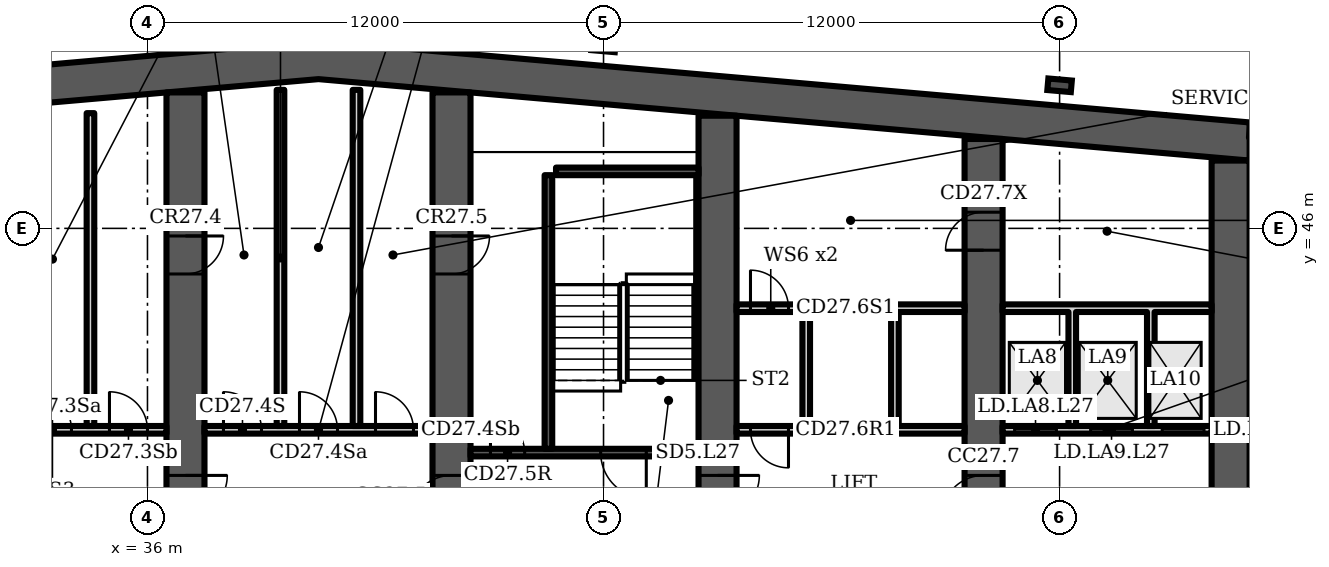
"""IFC4 building model, lengths in metres.
Left out: names, types, materials, properties, quantities, classifications, styles, units other than length and angle.
Written with IfcOpenShell. Run it as: python <this file> out.ifc"""

import sys

from ifc_helpers import new_model, si_unit, direction, frame, frame_2d, origin, origin_2d, place, context, subcontext, project, spatial, polyline, rectangle, i_section, outline, extrude, element, fill, save


model = new_model("IFC4")
c1 = context("Model", 3, precision=1e-05, world=origin(), true_north=direction((0.0, 1.0)))
c2 = subcontext(c1, "Body", "Model", "MODEL_VIEW")
j1 = project(units=[si_unit("LENGTHUNIT", "METRE"), si_unit("PLANEANGLEUNIT", "RADIAN")], contexts=[c1])
p1 = place(None, origin())
s1 = spatial("IfcSite", under=j1, at=p1, CompositionType="ELEMENT")
p2 = place(p1, origin())
s2 = spatial("IfcBuilding", under=s1, at=p2, CompositionType="ELEMENT")
p3 = place(p2, frame((0.0, 0.0, 118.3)))
s3 = spatial("IfcBuildingStorey", under=s2, at=p3, CompositionType="ELEMENT", Elevation=118.3)
p4 = place(p3, frame((0.0, 0.0, -0.0)))
e1 = element("IfcWall", 1, at=p4, inside=s3, PredefinedType="SHEAR", context=c2, shape_type="SweptSolid", body=[
    extrude(outline(polyline([(16.0, 47.784), (40.5, 49.927), (65.0, 47.784), (65.0, 48.787), (40.5, 50.931), (16.0, 48.787), (16.0, 47.784)])), origin(), (0.0, 0.0, 1.0), 3.6),
])
p5 = place(p3, frame((37.0, 35.0, 0.0), z_axis=(0.0, 0.0, 1.0), x_axis=(0.0, 1.0, 0.0)))
e2 = element("IfcWall", 2, at=p5, inside=s3, PredefinedType="SHEAR", context=c2, shape_type="SweptSolid", body=[
    extrude(rectangle(XDim=14.577, YDim=1.0, at=frame_2d((7.289, 0.0))), origin(), (0.0, 0.0, 1.0), 3.6),
])
p6 = place(p5, frame((3.4, 0.0, 0.0)))
e3 = element("IfcOpeningElement", 3, at=p6, cuts=e2, PredefinedType="OPENING", context=c2, shape_type="SweptSolid", body=[
    extrude(rectangle(XDim=1.1, YDim=2.1, at=frame_2d((0.55, 1.05))), frame((0.0, 0.51, 0.0), z_axis=(0.0, -1.0, 0.0), x_axis=(1.0, 0.0, 0.0)), (0.0, 0.0, 1.0), 1.02),
])
p7 = place(p5, frame((9.8, 0.0, 0.0)))
e4 = element("IfcOpeningElement", 4, at=p7, cuts=e2, PredefinedType="OPENING", context=c2, shape_type="SweptSolid", body=[
    extrude(rectangle(XDim=1.0, YDim=2.1, at=frame_2d((0.5, 1.05))), frame((0.0, 0.51, 0.0), z_axis=(0.0, -1.0, 0.0), x_axis=(1.0, 0.0, 0.0)), (0.0, 0.0, 1.0), 1.02),
])
p8 = place(p3, frame((44.0, 35.0, 0.0), z_axis=(0.0, 0.0, 1.0), x_axis=(0.0, 1.0, 0.0)))
e5 = element("IfcWall", 5, at=p8, inside=s3, PredefinedType="SHEAR", context=c2, shape_type="SweptSolid", body=[
    extrude(rectangle(XDim=14.577, YDim=1.0, at=frame_2d((7.289, 0.0))), origin(), (0.0, 0.0, 1.0), 3.6),
])
p9 = place(p8, frame((3.4, 0.0, 0.0)))
e6 = element("IfcOpeningElement", 6, at=p9, cuts=e5, PredefinedType="OPENING", context=c2, shape_type="SweptSolid", body=[
    extrude(rectangle(XDim=1.1, YDim=2.1, at=frame_2d((0.55, 1.05))), frame((0.0, 0.51, 0.0), z_axis=(0.0, -1.0, 0.0), x_axis=(1.0, 0.0, 0.0)), (0.0, 0.0, 1.0), 1.02),
])
p10 = place(p8, frame((9.8, 0.0, 0.0)))
e7 = element("IfcOpeningElement", 7, at=p10, cuts=e5, PredefinedType="OPENING", context=c2, shape_type="SweptSolid", body=[
    extrude(rectangle(XDim=1.0, YDim=2.1, at=frame_2d((0.5, 1.05))), frame((0.0, 0.51, 0.0), z_axis=(0.0, -1.0, 0.0), x_axis=(1.0, 0.0, 0.0)), (0.0, 0.0, 1.0), 1.02),
])
p11 = place(p3, frame((51.0, 35.0, 0.0), z_axis=(0.0, 0.0, 1.0), x_axis=(0.0, 1.0, 0.0)))
e8 = element("IfcWall", 8, at=p11, inside=s3, PredefinedType="SHEAR", context=c2, shape_type="SweptSolid", body=[
    extrude(rectangle(XDim=13.965, YDim=1.0, at=frame_2d((6.982, 0.0))), origin(), (0.0, 0.0, 1.0), 3.6),
])
p12 = place(p11, frame((3.4, 0.0, 0.0)))
e9 = element("IfcOpeningElement", 9, at=p12, cuts=e8, PredefinedType="OPENING", context=c2, shape_type="SweptSolid", body=[
    extrude(rectangle(XDim=1.1, YDim=2.1, at=frame_2d((0.55, 1.05))), frame((0.0, 0.51, 0.0), z_axis=(0.0, -1.0, 0.0), x_axis=(1.0, 0.0, 0.0)), (0.0, 0.0, 1.0), 1.02),
])
p13 = place(p3, frame((58.0, 35.0, 0.0), z_axis=(0.0, 0.0, 1.0), x_axis=(0.0, 1.0, 0.0)))
e10 = element("IfcWall", 10, at=p13, inside=s3, PredefinedType="SHEAR", context=c2, shape_type="SweptSolid", body=[
    extrude(rectangle(XDim=13.352, YDim=1.0, at=frame_2d((6.676, 0.0))), origin(), (0.0, 0.0, 1.0), 3.6),
])
p14 = place(p13, frame((10.426, 0.0, 0.0)))
e11 = element("IfcOpeningElement", 11, at=p14, cuts=e10, PredefinedType="OPENING", context=c2, shape_type="SweptSolid", body=[
    extrude(rectangle(XDim=1.0, YDim=2.1, at=frame_2d((0.5, 1.05))), frame((0.0, 0.51, 0.0), z_axis=(0.0, -1.0, 0.0), x_axis=(1.0, 0.0, 0.0)), (0.0, 0.0, 1.0), 1.02),
])
p15 = place(p13, frame((3.4, 0.0, 0.0)))
e12 = element("IfcOpeningElement", 12, at=p15, cuts=e10, PredefinedType="OPENING", context=c2, shape_type="SweptSolid", body=[
    extrude(rectangle(XDim=1.1, YDim=2.1, at=frame_2d((0.55, 1.05))), frame((0.0, 0.51, 0.0), z_axis=(0.0, -1.0, 0.0), x_axis=(1.0, 0.0, 0.0)), (0.0, 0.0, 1.0), 1.02),
])
p16 = place(p3, frame((64.5, 35.0, 0.0), z_axis=(0.0, 0.0, 1.0), x_axis=(0.0, 1.0, 0.0)))
e13 = element("IfcWall", 13, at=p16, inside=s3, PredefinedType="SHEAR", context=c2, shape_type="SweptSolid", body=[
    extrude(rectangle(XDim=12.784, YDim=1.0, at=frame_2d((6.392, 0.0))), origin(), (0.0, 0.0, 1.0), 3.6),
])
for number, where, z_axis, x_axis in (
    (14, (48.0, 50.815, 0.0), (0.0, 0.0, 1.0), (0.087, 0.996, 0.0)),
    (15, (60.0, 49.765, 0.0), (0.0, 0.0, 1.0), (0.087, 0.996, 0.0)),
):
    element("IfcColumn", number, at=place(p3, frame(where, z_axis=z_axis, x_axis=x_axis)), inside=s3, PredefinedType="COLUMN", context=c2, shape_type="SweptSolid", body=[
        extrude(i_section(OverallWidth=0.305, OverallDepth=0.62, WebThickness=0.021, FlangeThickness=0.04, FilletRadius=0.027, at=origin_2d()), origin(), (0.0, 0.0, 1.0), 3.6),
    ])
p17 = place(p3, frame((67.983, 48.326, 0.0), z_axis=(0.0, 0.0, 1.0), x_axis=(-0.996194, 0.087168, 0.0)))
e16 = element("IfcWall", 16, at=p17, inside=s3, PredefinedType="SOLIDWALL", context=c2, shape_type="SweptSolid", body=[
    extrude(rectangle(XDim=2.994, YDim=0.4, at=frame_2d((1.497, 0.0))), origin(), (0.0, 0.0, 1.0), 3.2),
])
p18 = place(p3, frame((30.5, 40.7, 0.0), z_axis=(0.0, 0.0, 1.0), x_axis=(1.0, 0.0, 0.0)))
e17 = element("IfcWall", 17, at=p18, inside=s3, PredefinedType="PARTITIONING", context=c2, shape_type="SweptSolid", body=[
    extrude(rectangle(XDim=6.0, YDim=0.2, at=frame_2d((3.0, 0.0))), origin(), (0.0, 0.0, 1.0), 3.2),
])
p19 = place(p18, frame((0.5, 0.0, 0.0)))
e18 = element("IfcOpeningElement", 18, at=p19, cuts=e17, PredefinedType="OPENING", context=c2, shape_type="SweptSolid", body=[
    extrude(rectangle(XDim=1.0, YDim=2.1, at=frame_2d((0.5, 1.05))), frame((0.0, 0.11, 0.0), z_axis=(0.0, -1.0, 0.0), x_axis=(1.0, 0.0, 0.0)), (0.0, 0.0, 1.0), 0.22),
])
p20 = place(p18, frame((2.5, 0.0, 0.0)))
e19 = element("IfcOpeningElement", 19, at=p20, cuts=e17, PredefinedType="OPENING", context=c2, shape_type="SweptSolid", body=[
    extrude(rectangle(XDim=1.0, YDim=2.1, at=frame_2d((0.5, 1.05))), frame((0.0, 0.11, 0.0), z_axis=(0.0, -1.0, 0.0), x_axis=(1.0, 0.0, 0.0)), (0.0, 0.0, 1.0), 0.22),
])
p21 = place(p18, frame((4.5, 0.0, 0.0)))
e20 = element("IfcOpeningElement", 20, at=p21, cuts=e17, PredefinedType="OPENING", context=c2, shape_type="SweptSolid", body=[
    extrude(rectangle(XDim=1.0, YDim=2.1, at=frame_2d((0.5, 1.05))), frame((0.0, 0.11, 0.0), z_axis=(0.0, -1.0, 0.0), x_axis=(1.0, 0.0, 0.0)), (0.0, 0.0, 1.0), 0.22),
])
p22 = place(p3, frame((34.5, 40.8, 0.0), z_axis=(0.0, 0.0, 1.0), x_axis=(0.0, 1.0, 0.0)))
e21 = element("IfcWall", 21, at=p22, inside=s3, PredefinedType="PARTITIONING", context=c2, shape_type="SweptSolid", body=[
    extrude(rectangle(XDim=8.232, YDim=0.2, at=frame_2d((4.116, 0.0))), origin(), (0.0, 0.0, 1.0), 3.2),
])
p23 = place(p3, frame((37.5, 40.7, 0.0), z_axis=(0.0, 0.0, 1.0), x_axis=(1.0, 0.0, 0.0)))
e22 = element("IfcWall", 22, at=p23, inside=s3, PredefinedType="PARTITIONING", context=c2, shape_type="SweptSolid", body=[
    extrude(rectangle(XDim=6.0, YDim=0.2, at=frame_2d((3.0, 0.0))), origin(), (0.0, 0.0, 1.0), 3.2),
])
p24 = place(p23, frame((0.5, 0.0, 0.0)))
e23 = element("IfcOpeningElement", 23, at=p24, cuts=e22, PredefinedType="OPENING", context=c2, shape_type="SweptSolid", body=[
    extrude(rectangle(XDim=1.0, YDim=2.1, at=frame_2d((0.5, 1.05))), frame((0.0, 0.11, 0.0), z_axis=(0.0, -1.0, 0.0), x_axis=(1.0, 0.0, 0.0)), (0.0, 0.0, 1.0), 0.22),
])
p25 = place(p23, frame((2.5, 0.0, 0.0)))
e24 = element("IfcOpeningElement", 24, at=p25, cuts=e22, PredefinedType="OPENING", context=c2, shape_type="SweptSolid", body=[
    extrude(rectangle(XDim=1.0, YDim=2.1, at=frame_2d((0.5, 1.05))), frame((0.0, 0.11, 0.0), z_axis=(0.0, -1.0, 0.0), x_axis=(1.0, 0.0, 0.0)), (0.0, 0.0, 1.0), 0.22),
])
p26 = place(p23, frame((4.5, 0.0, 0.0)))
e25 = element("IfcOpeningElement", 25, at=p26, cuts=e22, PredefinedType="OPENING", context=c2, shape_type="SweptSolid", body=[
    extrude(rectangle(XDim=1.0, YDim=2.1, at=frame_2d((0.5, 1.05))), frame((0.0, 0.11, 0.0), z_axis=(0.0, -1.0, 0.0), x_axis=(1.0, 0.0, 0.0)), (0.0, 0.0, 1.0), 0.22),
])
for number, where, z_axis, x_axis in (
    (26, (39.5, 40.8, 0.0), (0.0, 0.0, 1.0), (0.0, 1.0, 0.0)),
    (27, (41.5, 40.8, 0.0), (0.0, 0.0, 1.0), (0.0, 1.0, 0.0)),
):
    element("IfcWall", number, at=place(p3, frame(where, z_axis=z_axis, x_axis=x_axis)), inside=s3, PredefinedType="PARTITIONING", context=c2, shape_type="SweptSolid", body=[
        extrude(rectangle(XDim=8.844, YDim=0.2, at=frame_2d((4.422, 0.0))), origin(), (0.0, 0.0, 1.0), 3.2),
    ])
p27 = place(p3, frame((44.5, 40.1, 0.0), z_axis=(0.0, 0.0, 1.0), x_axis=(1.0, 0.0, 0.0)))
e28 = element("IfcWall", 28, at=p27, inside=s3, PredefinedType="SHEAR", context=c2, shape_type="SweptSolid", body=[
    extrude(rectangle(XDim=6.0, YDim=0.2, at=frame_2d((3.0, 0.0))), origin(), (0.0, 0.0, 1.0), 3.2),
])
p28 = place(p27, frame((3.425, 0.0, 0.0)))
e29 = element("IfcOpeningElement", 29, at=p28, cuts=e28, PredefinedType="OPENING", context=c2, shape_type="SweptSolid", body=[
    extrude(rectangle(XDim=1.2, YDim=2.1, at=frame_2d((0.6, 1.05))), frame((0.0, 0.11, 0.0), z_axis=(0.0, -1.0, 0.0), x_axis=(1.0, 0.0, 0.0)), (0.0, 0.0, 1.0), 0.22),
])
p29 = place(p27, frame((0.525, 0.0, 0.0)))
e30 = element("IfcOpeningElement", 30, at=p29, cuts=e28, PredefinedType="OPENING", context=c2, shape_type="SweptSolid", body=[
    extrude(rectangle(XDim=0.9, YDim=2.1, at=frame_2d((0.45, 1.05))), frame((0.0, 0.11, 0.0), z_axis=(0.0, -1.0, 0.0), x_axis=(1.0, 0.0, 0.0)), (0.0, 0.0, 1.0), 0.22),
])
p30 = place(p3, frame((46.55, 40.2, 0.0), z_axis=(0.0, 0.0, 1.0), x_axis=(0.0, 1.0, 0.0)))
e31 = element("IfcWall", 31, at=p30, inside=s3, PredefinedType="SHEAR", context=c2, shape_type="SweptSolid", body=[
    extrude(rectangle(XDim=7.2, YDim=0.2, at=frame_2d((3.6, 0.0))), origin(), (0.0, 0.0, 1.0), 3.2),
])
p31 = place(p3, frame((46.75, 47.5, 0.0), z_axis=(0.0, 0.0, 1.0), x_axis=(1.0, 0.0, 0.0)))
e32 = element("IfcWall", 32, at=p31, inside=s3, PredefinedType="SHEAR", context=c2, shape_type="SweptSolid", body=[
    extrude(rectangle(XDim=3.75, YDim=0.2, at=frame_2d((1.875, 0.0))), origin(), (0.0, 0.0, 1.0), 3.2),
])
p32 = place(p3, frame((51.5, 40.7, 0.0), z_axis=(0.0, 0.0, 1.0), x_axis=(1.0, 0.0, 0.0)))
e33 = element("IfcWall", 33, at=p32, inside=s3, PredefinedType="PARTITIONING", context=c2, shape_type="SweptSolid", body=[
    extrude(rectangle(XDim=6.0, YDim=0.2, at=frame_2d((3.0, 0.0))), origin(), (0.0, 0.0, 1.0), 3.2),
])
p33 = place(p32, frame((0.367, 0.0, 0.0)))
e34 = element("IfcOpeningElement", 34, at=p33, cuts=e33, PredefinedType="OPENING", context=c2, shape_type="SweptSolid", body=[
    extrude(rectangle(XDim=1.0, YDim=2.1, at=frame_2d((0.5, 1.05))), frame((0.0, 0.11, 0.0), z_axis=(0.0, -1.0, 0.0), x_axis=(1.0, 0.0, 0.0)), (0.0, 0.0, 1.0), 0.22),
])
p34 = place(p3, frame((51.5, 43.9, 0.0), z_axis=(0.0, 0.0, 1.0), x_axis=(1.0, 0.0, 0.0)))
e35 = element("IfcWall", 35, at=p34, inside=s3, PredefinedType="PARTITIONING", context=c2, shape_type="SweptSolid", body=[
    extrude(rectangle(XDim=6.0, YDim=0.2, at=frame_2d((3.0, 0.0))), origin(), (0.0, 0.0, 1.0), 3.2),
])
p35 = place(p34, frame((0.367, 0.0, 0.0)))
e36 = element("IfcOpeningElement", 36, at=p35, cuts=e35, PredefinedType="OPENING", context=c2, shape_type="SweptSolid", body=[
    extrude(rectangle(XDim=1.0, YDim=2.1, at=frame_2d((0.5, 1.05))), frame((0.0, 0.11, 0.0), z_axis=(0.0, -1.0, 0.0), x_axis=(1.0, 0.0, 0.0)), (0.0, 0.0, 1.0), 0.22),
])
p36 = place(p3, frame((0.0, 0.0, -0.0)))
e37 = element("IfcWall", 37, at=p36, inside=s3, PredefinedType="PARTITIONING", context=c2, shape_type="SweptSolid", body=[
    extrude(outline(polyline([(53.233, 40.8), (53.233, 43.8), (53.433, 43.8), (53.433, 40.8), (53.233, 40.8)])), origin(), (0.0, 0.0, 1.0), 3.2),
])
p37 = place(p3, frame((0.0, 0.0, -0.0)))
e38 = element("IfcWall", 38, at=p37, inside=s3, PredefinedType="PARTITIONING", context=c2, shape_type="SweptSolid", body=[
    extrude(outline(polyline([(55.567, 40.8), (55.567, 43.8), (55.767, 43.8), (55.767, 40.8), (55.567, 40.8)])), origin(), (0.0, 0.0, 1.0), 3.2),
])
p38 = place(p3, frame((58.5, 40.7, 0.0), z_axis=(0.0, 0.0, 1.0), x_axis=(1.0, 0.0, 0.0)))
e39 = element("IfcWall", 39, at=p38, inside=s3, PredefinedType="PARTITIONING", context=c2, shape_type="SweptSolid", body=[
    extrude(rectangle(XDim=5.5, YDim=0.2, at=frame_2d((2.75, 0.0))), origin(), (0.0, 0.0, 1.0), 3.2),
])
p39 = place(p38, frame((0.317, 0.0, 0.0)))
e40 = element("IfcOpeningElement", 40, at=p39, cuts=e39, PredefinedType="OPENING", context=c2, shape_type="SweptSolid", body=[
    extrude(rectangle(XDim=1.1, YDim=2.1, at=frame_2d((0.55, 1.05))), frame((0.0, 0.11, 0.0), z_axis=(0.0, -1.0, 0.0), x_axis=(1.0, 0.0, 0.0)), (0.0, 0.0, 1.0), 0.22),
])
p40 = place(p38, frame((2.317, 0.0, 0.0)))
e41 = element("IfcOpeningElement", 41, at=p40, cuts=e39, PredefinedType="OPENING", context=c2, shape_type="SweptSolid", body=[
    extrude(rectangle(XDim=1.1, YDim=2.1, at=frame_2d((0.55, 1.05))), frame((0.0, 0.11, 0.0), z_axis=(0.0, -1.0, 0.0), x_axis=(1.0, 0.0, 0.0)), (0.0, 0.0, 1.0), 0.22),
])
p41 = place(p38, frame((4.2, 0.0, 0.0)))
e42 = element("IfcOpeningElement", 42, at=p41, cuts=e39, PredefinedType="OPENING", context=c2, shape_type="SweptSolid", body=[
    extrude(rectangle(XDim=1.1, YDim=2.1, at=frame_2d((0.55, 1.05))), frame((0.0, 0.11, 0.0), z_axis=(0.0, -1.0, 0.0), x_axis=(1.0, 0.0, 0.0)), (0.0, 0.0, 1.0), 0.22),
])
p42 = place(p3, frame((0.0, 0.0, -0.0)))
e43 = element("IfcWall", 43, at=p42, inside=s3, PredefinedType="PARTITIONING", context=c2, shape_type="SweptSolid", body=[
    extrude(outline(polyline([(60.433, 40.8), (60.233, 40.8), (60.233, 43.8), (58.5, 43.8), (58.5, 44.0), (64.0, 44.0), (64.0, 43.8), (62.5, 43.8), (62.5, 40.8), (62.3, 40.8), (62.3, 43.8), (60.433, 43.8), (60.433, 40.8)])), origin(), (0.0, 0.0, 1.0), 3.2),
])
p43 = place(p20, origin())
e44 = element("IfcDoor", 44, at=p43, inside=s3, OperationType="SINGLE_SWING_LEFT", PredefinedType="DOOR", context=c2, shape_type="SweptSolid", body=[
    extrude(rectangle(XDim=1.0, YDim=2.1, at=frame_2d((0.5, 1.05))), frame((0.0, 0.025, 0.0), z_axis=(0.0, -1.0, 0.0), x_axis=(1.0, 0.0, 0.0)), (0.0, 0.0, 1.0), 0.05),
])
fill(e19, e44)
p44 = place(p21, origin())
e45 = element("IfcDoor", 45, at=p44, inside=s3, OperationType="SINGLE_SWING_LEFT", PredefinedType="DOOR", context=c2, shape_type="SweptSolid", body=[
    extrude(rectangle(XDim=1.0, YDim=2.1, at=frame_2d((0.5, 1.05))), frame((0.0, 0.025, 0.0), z_axis=(0.0, -1.0, 0.0), x_axis=(1.0, 0.0, 0.0)), (0.0, 0.0, 1.0), 0.05),
])
fill(e20, e45)
p45 = place(p24, origin())
e46 = element("IfcDoor", 46, at=p45, inside=s3, OperationType="SINGLE_SWING_LEFT", PredefinedType="DOOR", context=c2, shape_type="SweptSolid", body=[
    extrude(rectangle(XDim=1.0, YDim=2.1, at=frame_2d((0.5, 1.05))), frame((0.0, 0.025, 0.0), z_axis=(0.0, -1.0, 0.0), x_axis=(1.0, 0.0, 0.0)), (0.0, 0.0, 1.0), 0.05),
])
fill(e23, e46)
p46 = place(p25, origin())
e47 = element("IfcDoor", 47, at=p46, inside=s3, OperationType="SINGLE_SWING_LEFT", PredefinedType="DOOR", context=c2, shape_type="SweptSolid", body=[
    extrude(rectangle(XDim=1.0, YDim=2.1, at=frame_2d((0.5, 1.05))), frame((0.0, 0.025, 0.0), z_axis=(0.0, -1.0, 0.0), x_axis=(1.0, 0.0, 0.0)), (0.0, 0.0, 1.0), 0.05),
])
fill(e24, e47)
p47 = place(p26, origin())
e48 = element("IfcDoor", 48, at=p47, inside=s3, OperationType="SINGLE_SWING_LEFT", PredefinedType="DOOR", context=c2, shape_type="SweptSolid", body=[
    extrude(rectangle(XDim=1.0, YDim=2.1, at=frame_2d((0.5, 1.05))), frame((0.0, 0.025, 0.0), z_axis=(0.0, -1.0, 0.0), x_axis=(1.0, 0.0, 0.0)), (0.0, 0.0, 1.0), 0.05),
])
fill(e25, e48)
p48 = place(p28, origin())
e49 = element("IfcDoor", 49, at=p48, inside=s3, OperationType="SINGLE_SWING_RIGHT", PredefinedType="DOOR", context=c2, shape_type="SweptSolid", body=[
    extrude(rectangle(XDim=1.2, YDim=2.1, at=frame_2d((0.6, 1.05))), frame((0.0, 0.025, 0.0), z_axis=(0.0, -1.0, 0.0), x_axis=(1.0, 0.0, 0.0)), (0.0, 0.0, 1.0), 0.05),
])
fill(e29, e49)
p49 = place(p29, origin())
e50 = element("IfcDoor", 50, at=p49, inside=s3, OperationType="SINGLE_SWING_LEFT", PredefinedType="DOOR", context=c2, shape_type="SweptSolid", body=[
    extrude(rectangle(XDim=0.9, YDim=2.1, at=frame_2d((0.45, 1.05))), frame((0.0, 0.025, 0.0), z_axis=(0.0, -1.0, 0.0), x_axis=(1.0, 0.0, 0.0)), (0.0, 0.0, 1.0), 0.05),
])
fill(e30, e50)
p50 = place(p33, origin())
e51 = element("IfcDoor", 51, at=p50, inside=s3, OperationType="SINGLE_SWING_RIGHT", PredefinedType="DOOR", context=c2, shape_type="SweptSolid", body=[
    extrude(rectangle(XDim=1.0, YDim=2.1, at=frame_2d((0.5, 1.05))), frame((0.0, 0.025, 0.0), z_axis=(0.0, -1.0, 0.0), x_axis=(1.0, 0.0, 0.0)), (0.0, 0.0, 1.0), 0.05),
])
fill(e34, e51)
p51 = place(p35, origin())
e52 = element("IfcDoor", 52, at=p51, inside=s3, OperationType="SINGLE_SWING_LEFT", PredefinedType="DOOR", context=c2, shape_type="SweptSolid", body=[
    extrude(rectangle(XDim=1.0, YDim=2.1, at=frame_2d((0.5, 1.05))), frame((0.0, 0.025, 0.0), z_axis=(0.0, -1.0, 0.0), x_axis=(1.0, 0.0, 0.0)), (0.0, 0.0, 1.0), 0.05),
])
fill(e36, e52)
p52 = place(p39, origin())
e53 = element("IfcDoor", 53, at=p52, inside=s3, OperationType="DOUBLE_DOOR_SLIDING", PredefinedType="DOOR", context=c2, shape_type="SweptSolid", body=[
    extrude(rectangle(XDim=1.1, YDim=2.1, at=frame_2d((0.55, 1.05))), frame((0.0, 0.025, 0.0), z_axis=(0.0, -1.0, 0.0), x_axis=(1.0, 0.0, 0.0)), (0.0, 0.0, 1.0), 0.05),
])
fill(e40, e53)
p53 = place(p40, origin())
e54 = element("IfcDoor", 54, at=p53, inside=s3, OperationType="DOUBLE_DOOR_SLIDING", PredefinedType="DOOR", context=c2, shape_type="SweptSolid", body=[
    extrude(rectangle(XDim=1.1, YDim=2.1, at=frame_2d((0.55, 1.05))), frame((0.0, 0.025, 0.0), z_axis=(0.0, -1.0, 0.0), x_axis=(1.0, 0.0, 0.0)), (0.0, 0.0, 1.0), 0.05),
])
fill(e41, e54)
p54 = place(p41, origin())
e55 = element("IfcDoor", 55, at=p54, inside=s3, OperationType="DOUBLE_DOOR_SLIDING", PredefinedType="DOOR", context=c2, shape_type="SweptSolid", body=[
    extrude(rectangle(XDim=1.1, YDim=2.1, at=frame_2d((0.55, 1.05))), frame((0.0, 0.025, 0.0), z_axis=(0.0, -1.0, 0.0), x_axis=(1.0, 0.0, 0.0)), (0.0, 0.0, 1.0), 0.05),
])
fill(e42, e55)
p55 = place(p14, origin())
e56 = element("IfcDoor", 56, at=p55, inside=s3, OperationType="SINGLE_SWING_LEFT", PredefinedType="DOOR", context=c2, shape_type="SweptSolid", body=[
    extrude(rectangle(XDim=1.0, YDim=2.1, at=frame_2d((0.5, 1.05))), frame((0.0, 0.5, 0.0), z_axis=(0.0, -1.0, 0.0), x_axis=(1.0, 0.0, 0.0)), (0.0, 0.0, 1.0), 1.0),
])
fill(e11, e56)
p56 = place(p6, origin())
e57 = element("IfcDoor", 57, at=p56, inside=s3, OperationType="SINGLE_SWING_RIGHT", PredefinedType="DOOR", context=c2, shape_type="SweptSolid", body=[
    extrude(rectangle(XDim=1.1, YDim=2.1, at=frame_2d((0.55, 1.05))), frame((0.0, 0.025, 0.0), z_axis=(0.0, -1.0, 0.0), x_axis=(1.0, 0.0, 0.0)), (0.0, 0.0, 1.0), 0.05),
])
fill(e3, e57)
p57 = place(p7, origin())
e58 = element("IfcDoor", 58, at=p57, inside=s3, OperationType="SINGLE_SWING_RIGHT", PredefinedType="DOOR", context=c2, shape_type="SweptSolid", body=[
    extrude(rectangle(XDim=1.0, YDim=2.1, at=frame_2d((0.5, 1.05))), frame((0.0, 0.5, 0.0), z_axis=(0.0, -1.0, 0.0), x_axis=(1.0, 0.0, 0.0)), (0.0, 0.0, 1.0), 1.0),
])
fill(e4, e58)
p58 = place(p9, origin())
e59 = element("IfcDoor", 59, at=p58, inside=s3, OperationType="SINGLE_SWING_LEFT", PredefinedType="DOOR", context=c2, shape_type="SweptSolid", body=[
    extrude(rectangle(XDim=1.1, YDim=2.1, at=frame_2d((0.55, 1.05))), frame((0.0, 0.025, 0.0), z_axis=(0.0, -1.0, 0.0), x_axis=(1.0, 0.0, 0.0)), (0.0, 0.0, 1.0), 0.05),
])
fill(e6, e59)
p59 = place(p10, origin())
e60 = element("IfcDoor", 60, at=p59, inside=s3, OperationType="SINGLE_SWING_RIGHT", PredefinedType="DOOR", context=c2, shape_type="SweptSolid", body=[
    extrude(rectangle(XDim=1.0, YDim=2.1, at=frame_2d((0.5, 1.05))), frame((0.0, 0.5, 0.0), z_axis=(0.0, -1.0, 0.0), x_axis=(1.0, 0.0, 0.0)), (0.0, 0.0, 1.0), 1.0),
])
fill(e7, e60)
p60 = place(p12, origin())
e61 = element("IfcDoor", 61, at=p60, inside=s3, OperationType="SINGLE_SWING_RIGHT", PredefinedType="DOOR", context=c2, shape_type="SweptSolid", body=[
    extrude(rectangle(XDim=1.1, YDim=2.1, at=frame_2d((0.55, 1.05))), frame((0.0, 0.025, 0.0), z_axis=(0.0, -1.0, 0.0), x_axis=(1.0, 0.0, 0.0)), (0.0, 0.0, 1.0), 0.05),
])
fill(e9, e61)
p61 = place(p15, origin())
e62 = element("IfcDoor", 62, at=p61, inside=s3, OperationType="SINGLE_SWING_LEFT", PredefinedType="DOOR", context=c2, shape_type="SweptSolid", body=[
    extrude(rectangle(XDim=1.1, YDim=2.1, at=frame_2d((0.55, 1.05))), frame((0.0, 0.025, 0.0), z_axis=(0.0, -1.0, 0.0), x_axis=(1.0, 0.0, 0.0)), (0.0, 0.0, 1.0), 0.05),
])
fill(e12, e62)
save(model, sys.argv[1])
